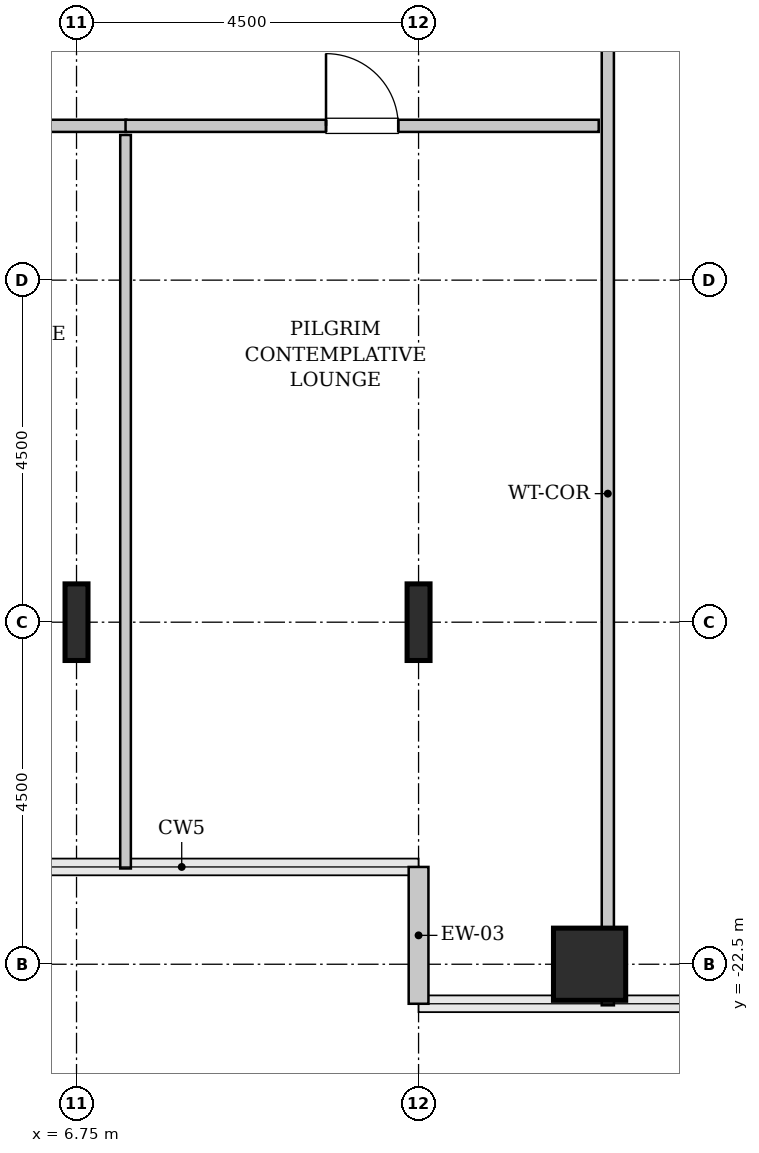
"""IFC4 building model, lengths in metres.
Left out: names, types, materials, properties, quantities, classifications, styles, units other than length and angle.
Written with IfcOpenShell. Run it as: python <this file> out.ifc"""

import sys

from ifc_helpers import new_model, si_unit, direction, frame, frame_2d, origin, origin_2d, place, context, subcontext, project, spatial, rectangle, hollow_rectangle, i_section, extrude, source, transform, mapped, element, fill, save


model = new_model("IFC4")
c1 = context("Model", 3, precision=1e-05, world=origin(), true_north=direction((0.0, 1.0)))
c2 = subcontext(c1, "Body", "Model", "MODEL_VIEW")
j1 = project(units=[si_unit("LENGTHUNIT", "METRE"), si_unit("PLANEANGLEUNIT", "RADIAN")], contexts=[c1])
p1 = place(None, origin())
s1 = spatial("IfcSite", under=j1, at=p1, CompositionType="ELEMENT")
p2 = place(p1, origin())
s2 = spatial("IfcBuilding", under=s1, at=p2, CompositionType="ELEMENT")
p3 = place(p2, frame((0.0, 0.0, 94.6)))
s3 = spatial("IfcBuildingStorey", under=s2, at=p3, CompositionType="ELEMENT", Elevation=94.6)
m1 = source(origin(), c2, "Body", "SweptSolid", [
    extrude(i_section(OverallWidth=0.302, OverallDepth=1.008, WebThickness=0.021, FlangeThickness=0.04, FilletRadius=0.03, at=origin_2d()), origin(), (0.0, 0.0, 1.0), 3.8),
])
for number, where, z_axis, x_axis in (
    (1, (6.75, -18.0, 0.0), (0.0, 0.0, 1.0), (1.0, 0.0, 0.0)),
    (2, (11.25, -18.0, 0.0), (0.0, 0.0, 1.0), (1.0, 0.0, 0.0)),
):
    element("IfcColumn", number, at=place(p3, frame(where, z_axis=z_axis, x_axis=x_axis)), inside=s3, PredefinedType="COLUMN", context=c2, shape_type="MappedRepresentation", body=[
        mapped(m1, transform((0.0, 0.0, 0.0), x_axis=(1.0, 0.0, 0.0), y_axis=(0.0, 1.0, 0.0), z_axis=(0.0, 0.0, 1.0), scale=1.0)),
    ])
m2 = source(origin(), c2, "Body", "SweptSolid", [
    extrude(hollow_rectangle(XDim=0.95, YDim=0.95, WallThickness=0.045, InnerFilletRadius=0.045, OuterFilletRadius=0.09, at=origin_2d()), origin(), (0.0, 0.0, 1.0), 3.8),
])
p4 = place(p3, frame((13.5, -22.5, 0.0), z_axis=(0.0, 0.0, 1.0), x_axis=(1.0, 0.0, 0.0)))
e3 = element("IfcColumn", 3, at=p4, inside=s3, PredefinedType="COLUMN", context=c2, shape_type="MappedRepresentation", body=[
    mapped(m2, transform((0.0, 0.0, 0.0), x_axis=(1.0, 0.0, 0.0), y_axis=(0.0, 1.0, 0.0), z_axis=(0.0, 0.0, 1.0), scale=1.0)),
])
m3 = source(origin(), c2, "Body", "SweptSolid", [
    extrude(rectangle(XDim=1.8, YDim=0.26, at=frame_2d((0.9, 0.0))), origin(), (0.0, 0.0, 1.0), 3.55),
])
p5 = place(p3, frame((11.25, -21.22, 0.0), z_axis=(0.0, 0.0, 1.0), x_axis=(0.0, -1.0, 0.0)))
e4 = element("IfcWall", 4, at=p5, inside=s3, PredefinedType="SOLIDWALL", context=c2, shape_type="MappedRepresentation", body=[
    mapped(m3, transform((0.0, 0.0, 0.0), x_axis=(1.0, 0.0, 0.0), y_axis=(0.0, 1.0, 0.0), z_axis=(0.0, 0.0, 1.0), scale=1.0)),
])
m4 = source(origin(), c2, "Body", "SweptSolid", [
    extrude(rectangle(XDim=16.245, YDim=0.16, at=frame_2d((8.123, 0.0))), origin(), (0.0, 0.0, 1.0), 3.535),
])
p6 = place(p3, frame((13.74, -23.04, 0.0), z_axis=(0.0, 0.0, 1.0), x_axis=(0.0, 1.0, 0.0)))
e5 = element("IfcWall", 5, at=p6, inside=s3, PredefinedType="PARTITIONING", context=c2, shape_type="MappedRepresentation", body=[
    mapped(m4, transform((0.0, 0.0, 0.0), x_axis=(1.0, 0.0, 0.0), y_axis=(0.0, 1.0, 0.0), z_axis=(0.0, 0.0, 1.0), scale=1.0)),
])
p7 = place(p6, frame((13.413, 0.0, 0.0)))
e6 = element("IfcOpeningElement", 6, at=p7, cuts=e5, PredefinedType="OPENING", context=c2, shape_type="SweptSolid", body=[
    extrude(rectangle(XDim=0.95, YDim=2.1, at=frame_2d((0.475, 1.05))), frame((0.0, 0.09, 0.0), z_axis=(0.0, -1.0, 0.0), x_axis=(1.0, 0.0, 0.0)), (0.0, 0.0, 1.0), 0.18),
])
m5 = source(origin(), c2, "Body", "SweptSolid", [
    extrude(rectangle(XDim=3.905, YDim=0.16, at=frame_2d((1.953, 0.0))), origin(), (0.0, 0.0, 1.0), 3.535),
])
p8 = place(p3, frame((3.5, -11.47, 0.0), z_axis=(0.0, 0.0, 1.0), x_axis=(1.0, 0.0, 0.0)))
e7 = element("IfcWall", 7, at=p8, inside=s3, PredefinedType="PARTITIONING", context=c2, shape_type="MappedRepresentation", body=[
    mapped(m5, transform((0.0, 0.0, 0.0), x_axis=(1.0, 0.0, 0.0), y_axis=(0.0, 1.0, 0.0), z_axis=(0.0, 0.0, 1.0), scale=1.0)),
])
p9 = place(p8, frame((1.478, 0.0, 0.0)))
e8 = element("IfcOpeningElement", 8, at=p9, cuts=e7, PredefinedType="OPENING", context=c2, shape_type="SweptSolid", body=[
    extrude(rectangle(XDim=0.95, YDim=2.1, at=frame_2d((0.475, 1.05))), frame((0.0, 0.09, 0.0), z_axis=(0.0, -1.0, 0.0), x_axis=(1.0, 0.0, 0.0)), (0.0, 0.0, 1.0), 0.18),
])
m6 = source(origin(), c2, "Body", "SweptSolid", [
    extrude(rectangle(XDim=9.65, YDim=0.14, at=frame_2d((4.825, 0.0))), origin(), (0.0, 0.0, 1.0), 3.535),
])
p10 = place(p3, frame((7.395, -21.24, 0.0), z_axis=(0.0, 0.0, 1.0), x_axis=(0.0, 1.0, 0.0)))
e9 = element("IfcWall", 9, at=p10, inside=s3, PredefinedType="PARTITIONING", context=c2, shape_type="MappedRepresentation", body=[
    mapped(m6, transform((0.0, 0.0, 0.0), x_axis=(1.0, 0.0, 0.0), y_axis=(0.0, 1.0, 0.0), z_axis=(0.0, 0.0, 1.0), scale=1.0)),
])
m7 = source(origin(), c2, "Body", "SweptSolid", [
    extrude(rectangle(XDim=6.225, YDim=0.16, at=frame_2d((3.113, 0.0))), origin(), (0.0, 0.0, 1.0), 3.535),
])
p11 = place(p3, frame((7.395, -11.47, 0.0), z_axis=(0.0, 0.0, 1.0), x_axis=(1.0, 0.0, 0.0)))
e10 = element("IfcWall", 10, at=p11, inside=s3, PredefinedType="PARTITIONING", context=c2, shape_type="MappedRepresentation", body=[
    mapped(m7, transform((0.0, 0.0, 0.0), x_axis=(1.0, 0.0, 0.0), y_axis=(0.0, 1.0, 0.0), z_axis=(0.0, 0.0, 1.0), scale=1.0)),
])
p12 = place(p11, frame((2.637, 0.0, 0.0)))
e11 = element("IfcOpeningElement", 11, at=p12, cuts=e10, PredefinedType="OPENING", context=c2, shape_type="SweptSolid", body=[
    extrude(rectangle(XDim=0.95, YDim=2.1, at=frame_2d((0.475, 1.05))), frame((0.0, 0.09, 0.0), z_axis=(0.0, -1.0, 0.0), x_axis=(1.0, 0.0, 0.0)), (0.0, 0.0, 1.0), 0.18),
])
m8 = source(origin(), c2, "Body", "SweptSolid", [
    extrude(rectangle(XDim=0.95, YDim=2.1, at=frame_2d((0.475, 1.05))), frame((0.0, 0.025, 0.0), z_axis=(0.0, -1.0, 0.0), x_axis=(1.0, 0.0, 0.0)), (0.0, 0.0, 1.0), 0.05),
])
p13 = place(p12, origin())
e12 = element("IfcDoor", 12, at=p13, inside=s3, OperationType="SINGLE_SWING_LEFT", PredefinedType="DOOR", context=c2, shape_type="MappedRepresentation", body=[
    mapped(m8, transform((0.0, 0.0, 0.0), x_axis=(1.0, 0.0, 0.0), y_axis=(0.0, 1.0, 0.0), z_axis=(0.0, 0.0, 1.0), scale=1.0)),
])
fill(e11, e12)
save(model, sys.argv[1])
